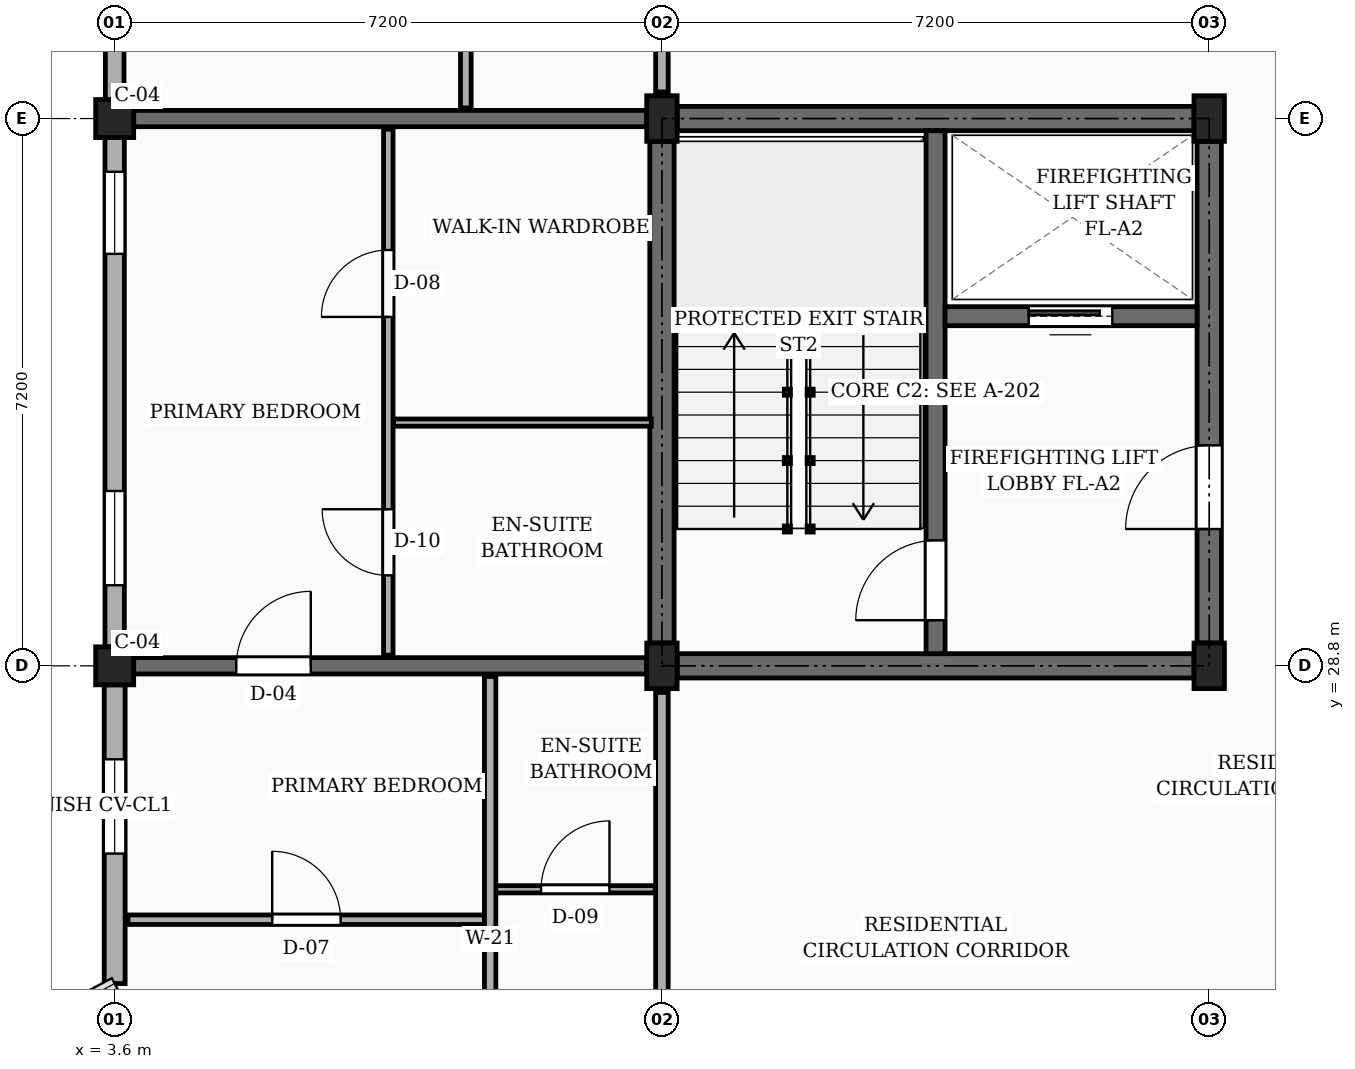
"""IFC4 building model, lengths in metres.
Left out: names, types, materials, properties, quantities, classifications, styles, units other than length and angle.
Written with IfcOpenShell. Run it as: python <this file> out.ifc"""

import sys

from ifc_helpers import new_model, si_unit, direction, frame, frame_2d, origin, origin_2d, place, context, subcontext, project, spatial, rectangle, extrude, element, fill, save


model = new_model("IFC4")
c1 = context("Model", 3, precision=1e-05, world=origin(), true_north=direction((0.0, 1.0)))
c2 = subcontext(c1, "Body", "Model", "MODEL_VIEW")
j1 = project(units=[si_unit("LENGTHUNIT", "METRE"), si_unit("PLANEANGLEUNIT", "RADIAN")], contexts=[c1])
p1 = place(None, origin())
s1 = spatial("IfcSite", under=j1, at=p1, CompositionType="ELEMENT")
p2 = place(p1, origin())
s2 = spatial("IfcBuilding", under=s1, at=p2, CompositionType="ELEMENT")
p3 = place(p2, frame((0.0, 0.0, 29.7)))
s3 = spatial("IfcBuildingStorey", under=s2, at=p3, CompositionType="ELEMENT", Elevation=29.7)
for number, where, z_axis, x_axis in (
    (1, (3.6, 28.8, 0.0), (0.0, 0.0, 1.0), (1.0, 0.0, 0.0)),
    (2, (3.6, 36.0, 0.0), (0.0, 0.0, 1.0), (1.0, 0.0, 0.0)),
):
    element("IfcColumn", number, at=place(p3, frame(where, z_axis=z_axis, x_axis=x_axis)), inside=s3, PredefinedType="COLUMN", context=c2, shape_type="SweptSolid", body=[
        extrude(rectangle(XDim=0.5, YDim=0.5, at=origin_2d()), origin(), (0.0, 0.0, 1.0), 3.15),
    ])
for number, where, z_axis, x_axis in (
    (3, (10.8, 28.8, 0.0), (0.0, 0.0, 1.0), (1.0, 0.0, 0.0)),
    (4, (10.8, 36.0, 0.0), (0.0, 0.0, 1.0), (1.0, 0.0, 0.0)),
    (5, (18.0, 28.8, 0.0), (0.0, 0.0, 1.0), (1.0, 0.0, 0.0)),
    (6, (18.0, 36.0, 0.0), (0.0, 0.0, 1.0), (1.0, 0.0, 0.0)),
):
    element("IfcColumn", number, at=place(p3, frame(where, z_axis=z_axis, x_axis=x_axis)), inside=s3, PredefinedType="COLUMN", context=c2, shape_type="SweptSolid", body=[
        extrude(rectangle(XDim=0.4, YDim=0.6, at=origin_2d()), origin(), (0.0, 0.0, 1.0), 3.15),
    ])
p4 = place(p3, frame((3.85, 28.8, 0.0), z_axis=(0.0, 0.0, 1.0), x_axis=(1.0, 0.0, 0.0)))
e7 = element("IfcWall", 7, at=p4, inside=s3, PredefinedType="SOLIDWALL", context=c2, shape_type="SweptSolid", body=[
    extrude(rectangle(XDim=6.75, YDim=0.215, at=frame_2d((3.375, 0.0))), origin(), (0.0, 0.0, 1.0), 2.17),
])
p5 = place(p4, frame((1.35, 0.0, 0.0)))
e8 = element("IfcOpeningElement", 8, at=p5, cuts=e7, PredefinedType="OPENING", context=c2, shape_type="SweptSolid", body=[
    extrude(rectangle(XDim=0.98, YDim=2.12, at=frame_2d((0.49, 1.06))), frame((0.0, 0.118, 0.0), z_axis=(0.0, -1.0, 0.0), x_axis=(1.0, 0.0, 0.0)), (0.0, 0.0, 1.0), 0.235),
])
p6 = place(p3, frame((3.85, 36.0, 0.0), z_axis=(0.0, 0.0, 1.0), x_axis=(1.0, 0.0, 0.0)))
e9 = element("IfcWall", 9, at=p6, inside=s3, PredefinedType="SOLIDWALL", context=c2, shape_type="SweptSolid", body=[
    extrude(rectangle(XDim=6.75, YDim=0.215, at=frame_2d((3.375, 0.0))), origin(), (0.0, 0.0, 1.0), 2.17),
])
p7 = place(p3, frame((3.6, 42.95, 0.0), z_axis=(0.0, 0.0, 1.0), x_axis=(0.0, -1.0, 0.0)))
e10 = element("IfcWall", 10, at=p7, inside=s3, PredefinedType="SOLIDWALL", context=c2, shape_type="SweptSolid", body=[
    extrude(rectangle(XDim=6.7, YDim=0.245, at=frame_2d((3.35, 0.0))), origin(), (0.0, 0.0, 1.0), 2.44),
])
p8 = place(p7, frame((0.45, 0.0, 0.78)))
e11 = element("IfcOpeningElement", 11, at=p8, cuts=e10, PredefinedType="OPENING", context=c2, shape_type="SweptSolid", body=[
    extrude(rectangle(XDim=0.92, YDim=1.15, at=frame_2d((0.46, 0.575))), frame((0.0, 0.133, 0.0), z_axis=(0.0, -1.0, 0.0), x_axis=(1.0, 0.0, 0.0)), (0.0, 0.0, 1.0), 0.265),
])
p9 = place(p7, frame((4.65, 0.0, 0.78)))
e12 = element("IfcOpeningElement", 12, at=p9, cuts=e10, PredefinedType="OPENING", context=c2, shape_type="SweptSolid", body=[
    extrude(rectangle(XDim=1.08, YDim=1.15, at=frame_2d((0.54, 0.575))), frame((0.0, 0.133, 0.0), z_axis=(0.0, -1.0, 0.0), x_axis=(1.0, 0.0, 0.0)), (0.0, 0.0, 1.0), 0.265),
])
p10 = place(p3, frame((3.6, 35.75, 0.0), z_axis=(0.0, 0.0, 1.0), x_axis=(0.0, -1.0, 0.0)))
e13 = element("IfcWall", 13, at=p10, inside=s3, PredefinedType="SOLIDWALL", context=c2, shape_type="SweptSolid", body=[
    extrude(rectangle(XDim=6.7, YDim=0.255, at=frame_2d((3.35, 0.0))), origin(), (0.0, 0.0, 1.0), 2.44),
])
p11 = place(p10, frame((0.45, 0.0, 0.78)))
e14 = element("IfcOpeningElement", 14, at=p11, cuts=e13, PredefinedType="OPENING", context=c2, shape_type="SweptSolid", body=[
    extrude(rectangle(XDim=1.08, YDim=1.15, at=frame_2d((0.54, 0.575))), frame((0.0, 0.137, 0.0), z_axis=(0.0, -1.0, 0.0), x_axis=(1.0, 0.0, 0.0)), (0.0, 0.0, 1.0), 0.275),
])
p12 = place(p10, frame((4.65, 0.0, 0.78)))
e15 = element("IfcOpeningElement", 15, at=p12, cuts=e13, PredefinedType="OPENING", context=c2, shape_type="SweptSolid", body=[
    extrude(rectangle(XDim=1.24, YDim=1.15, at=frame_2d((0.62, 0.575))), frame((0.0, 0.137, 0.0), z_axis=(0.0, -1.0, 0.0), x_axis=(1.0, 0.0, 0.0)), (0.0, 0.0, 1.0), 0.275),
])
p13 = place(p3, frame((3.6, 28.55, 0.0), z_axis=(0.0, 0.0, 1.0), x_axis=(0.0, -1.0, 0.0)))
e16 = element("IfcWall", 16, at=p13, inside=s3, PredefinedType="SOLIDWALL", context=c2, shape_type="SweptSolid", body=[
    extrude(rectangle(XDim=3.93, YDim=0.275, at=frame_2d((1.965, 0.0))), origin(), (0.0, 0.0, 1.0), 2.44),
])
p14 = place(p13, frame((0.98, 0.0, 0.78)))
e17 = element("IfcOpeningElement", 17, at=p14, cuts=e16, PredefinedType="OPENING", context=c2, shape_type="SweptSolid", body=[
    extrude(rectangle(XDim=1.24, YDim=1.15, at=frame_2d((0.62, 0.575))), frame((0.0, 0.147, 0.0), z_axis=(0.0, -1.0, 0.0), x_axis=(1.0, 0.0, 0.0)), (0.0, 0.0, 1.0), 0.295),
])
p15 = place(p3, frame((10.8, 29.1, 0.0), z_axis=(0.0, 0.0, 1.0), x_axis=(0.0, 1.0, 0.0)))
e18 = element("IfcWall", 18, at=p15, inside=s3, PredefinedType="SHEAR", context=c2, shape_type="SweptSolid", body=[
    extrude(rectangle(XDim=6.6, YDim=0.32, at=frame_2d((3.3, 0.0))), origin(), (0.0, 0.0, 1.0), 2.87),
])
p16 = place(p3, frame((11.0, 36.0, 0.0), z_axis=(0.0, 0.0, 1.0), x_axis=(1.0, 0.0, 0.0)))
e19 = element("IfcWall", 19, at=p16, inside=s3, PredefinedType="SHEAR", context=c2, shape_type="SweptSolid", body=[
    extrude(rectangle(XDim=6.8, YDim=0.32, at=frame_2d((3.4, 0.0))), origin(), (0.0, 0.0, 1.0), 2.87),
])
p17 = place(p3, frame((18.0, 29.1, 0.0), z_axis=(0.0, 0.0, 1.0), x_axis=(0.0, 1.0, 0.0)))
e20 = element("IfcWall", 20, at=p17, inside=s3, PredefinedType="SHEAR", context=c2, shape_type="SweptSolid", body=[
    extrude(rectangle(XDim=6.6, YDim=0.32, at=frame_2d((3.3, 0.0))), origin(), (0.0, 0.0, 1.0), 2.87),
])
p18 = place(p17, frame((1.5, 0.0, 0.0)))
e21 = element("IfcOpeningElement", 21, at=p18, cuts=e20, PredefinedType="OPENING", context=c2, shape_type="SweptSolid", body=[
    extrude(rectangle(XDim=1.1, YDim=2.15, at=frame_2d((0.55, 1.075))), frame((0.0, 0.17, 0.0), z_axis=(0.0, -1.0, 0.0), x_axis=(1.0, 0.0, 0.0)), (0.0, 0.0, 1.0), 0.34),
])
p19 = place(p3, frame((11.0, 28.8, 0.0), z_axis=(0.0, 0.0, 1.0), x_axis=(1.0, 0.0, 0.0)))
e22 = element("IfcWall", 22, at=p19, inside=s3, PredefinedType="SHEAR", context=c2, shape_type="SweptSolid", body=[
    extrude(rectangle(XDim=6.8, YDim=0.32, at=frame_2d((3.4, 0.0))), origin(), (0.0, 0.0, 1.0), 2.87),
])
p20 = place(p3, frame((14.4, 28.96, 0.0), z_axis=(0.0, 0.0, 1.0), x_axis=(0.0, 1.0, 0.0)))
e23 = element("IfcWall", 23, at=p20, inside=s3, PredefinedType="SHEAR", context=c2, shape_type="SweptSolid", body=[
    extrude(rectangle(XDim=6.88, YDim=0.25, at=frame_2d((3.44, 0.0))), origin(), (0.0, 0.0, 1.0), 2.87),
])
p21 = place(p20, frame((0.44, 0.0, 0.0)))
e24 = element("IfcOpeningElement", 24, at=p21, cuts=e23, PredefinedType="OPENING", context=c2, shape_type="SweptSolid", body=[
    extrude(rectangle(XDim=1.05, YDim=2.15, at=frame_2d((0.525, 1.075))), frame((0.0, 0.135, 0.0), z_axis=(0.0, -1.0, 0.0), x_axis=(1.0, 0.0, 0.0)), (0.0, 0.0, 1.0), 0.27),
])
p22 = place(p3, frame((14.525, 33.4, 0.0), z_axis=(0.0, 0.0, 1.0), x_axis=(1.0, 0.0, 0.0)))
e25 = element("IfcWall", 25, at=p22, inside=s3, PredefinedType="SHEAR", context=c2, shape_type="SweptSolid", body=[
    extrude(rectangle(XDim=3.315, YDim=0.25, at=frame_2d((1.658, 0.0))), origin(), (0.0, 0.0, 1.0), 2.87),
])
p23 = place(p22, frame((1.1, 0.0, 0.0)))
e26 = element("IfcOpeningElement", 26, at=p23, cuts=e25, PredefinedType="OPENING", context=c2, shape_type="SweptSolid", body=[
    extrude(rectangle(XDim=1.1, YDim=2.2, at=frame_2d((0.55, 1.1))), frame((0.0, 0.135, 0.0), z_axis=(0.0, -1.0, 0.0), x_axis=(1.0, 0.0, 0.0)), (0.0, 0.0, 1.0), 0.27),
])
p24 = place(p3, frame((10.8, 21.95, 0.0), z_axis=(0.0, 0.0, 1.0), x_axis=(0.0, 1.0, 0.0)))
e27 = element("IfcWall", 27, at=p24, inside=s3, PredefinedType="PARTITIONING", context=c2, shape_type="SweptSolid", body=[
    extrude(rectangle(XDim=6.5, YDim=0.165, at=frame_2d((3.25, 0.0))), origin(), (0.0, 0.0, 1.0), 2.305),
])
p25 = place(p24, frame((1.0, 0.0, 0.0)))
e28 = element("IfcOpeningElement", 28, at=p25, cuts=e27, PredefinedType="OPENING", context=c2, shape_type="SweptSolid", body=[
    extrude(rectangle(XDim=1.0, YDim=2.15, at=frame_2d((0.5, 1.075))), frame((0.0, 0.093, 0.0), z_axis=(0.0, -1.0, 0.0), x_axis=(1.0, 0.0, 0.0)), (0.0, 0.0, 1.0), 0.185),
])
p26 = place(p3, frame((10.8, 36.35, 0.0), z_axis=(0.0, 0.0, 1.0), x_axis=(0.0, 1.0, 0.0)))
e29 = element("IfcWall", 29, at=p26, inside=s3, PredefinedType="PARTITIONING", context=c2, shape_type="SweptSolid", body=[
    extrude(rectangle(XDim=6.5, YDim=0.165, at=frame_2d((3.25, 0.0))), origin(), (0.0, 0.0, 1.0), 2.305),
])
p27 = place(p26, frame((1.0, 0.0, 0.0)))
e30 = element("IfcOpeningElement", 30, at=p27, cuts=e29, PredefinedType="OPENING", context=c2, shape_type="SweptSolid", body=[
    extrude(rectangle(XDim=0.94, YDim=2.12, at=frame_2d((0.47, 1.06))), frame((0.0, 0.093, 0.0), z_axis=(0.0, -1.0, 0.0), x_axis=(1.0, 0.0, 0.0)), (0.0, 0.0, 1.0), 0.185),
])
p28 = place(p3, frame((3.775, 25.46, 0.0), z_axis=(0.0, 0.0, 1.0), x_axis=(1.0, 0.0, 0.0)))
e31 = element("IfcWall", 31, at=p28, inside=s3, PredefinedType="PARTITIONING", context=c2, shape_type="SweptSolid", body=[
    extrude(rectangle(XDim=4.695, YDim=0.125, at=frame_2d((2.348, 0.0))), origin(), (0.0, 0.0, 1.0), 2.305),
])
p29 = place(p28, frame((1.897, 0.0, 0.0)))
e32 = element("IfcOpeningElement", 32, at=p29, cuts=e31, PredefinedType="OPENING", context=c2, shape_type="SweptSolid", body=[
    extrude(rectangle(XDim=0.9, YDim=2.1, at=frame_2d((0.45, 1.05))), frame((0.0, 0.073, 0.0), z_axis=(0.0, -1.0, 0.0), x_axis=(1.0, 0.0, 0.0)), (0.0, 0.0, 1.0), 0.145),
])
p30 = place(p3, frame((8.61, 25.86, 0.0), z_axis=(0.0, 0.0, 1.0), x_axis=(1.0, 0.0, 0.0)))
e33 = element("IfcWall", 33, at=p30, inside=s3, PredefinedType="PARTITIONING", context=c2, shape_type="SweptSolid", body=[
    extrude(rectangle(XDim=2.1, YDim=0.095, at=frame_2d((1.05, 0.0))), origin(), (0.0, 0.0, 1.0), 2.305),
])
p31 = place(p30, frame((0.6, 0.0, 0.0)))
e34 = element("IfcOpeningElement", 34, at=p31, cuts=e33, PredefinedType="OPENING", context=c2, shape_type="SweptSolid", body=[
    extrude(rectangle(XDim=0.9, YDim=2.05, at=frame_2d((0.45, 1.025))), frame((0.0, 0.058, 0.0), z_axis=(0.0, -1.0, 0.0), x_axis=(1.0, 0.0, 0.0)), (0.0, 0.0, 1.0), 0.115),
])
p32 = place(p3, frame((8.54, 21.74, 0.0), z_axis=(0.0, 0.0, 1.0), x_axis=(0.0, 1.0, 0.0)))
e35 = element("IfcWall", 35, at=p32, inside=s3, PredefinedType="PARTITIONING", context=c2, shape_type="SweptSolid", body=[
    extrude(rectangle(XDim=6.92, YDim=0.15, at=frame_2d((3.46, 0.0))), origin(), (0.0, 0.0, 1.0), 2.305),
])
p33 = place(p32, frame((1.31, 0.0, 0.0)))
e36 = element("IfcOpeningElement", 36, at=p33, cuts=e35, PredefinedType="OPENING", context=c2, shape_type="SweptSolid", body=[
    extrude(rectangle(XDim=0.95, YDim=2.1, at=frame_2d((0.475, 1.05))), frame((0.0, 0.085, 0.0), z_axis=(0.0, -1.0, 0.0), x_axis=(1.0, 0.0, 0.0)), (0.0, 0.0, 1.0), 0.17),
])
p34 = place(p3, frame((7.2, 28.94, 0.0), z_axis=(0.0, 0.0, 1.0), x_axis=(0.0, 1.0, 0.0)))
e37 = element("IfcWall", 37, at=p34, inside=s3, PredefinedType="PARTITIONING", context=c2, shape_type="SweptSolid", body=[
    extrude(rectangle(XDim=6.92, YDim=0.125, at=frame_2d((3.46, 0.0))), origin(), (0.0, 0.0, 1.0), 2.305),
])
p35 = place(p34, frame((1.05, 0.0, 0.0)))
e38 = element("IfcOpeningElement", 38, at=p35, cuts=e37, PredefinedType="OPENING", context=c2, shape_type="SweptSolid", body=[
    extrude(rectangle(XDim=0.87, YDim=2.05, at=frame_2d((0.435, 1.025))), frame((0.0, 0.073, 0.0), z_axis=(0.0, -1.0, 0.0), x_axis=(1.0, 0.0, 0.0)), (0.0, 0.0, 1.0), 0.145),
])
p36 = place(p34, frame((4.45, 0.0, 0.0)))
e39 = element("IfcOpeningElement", 39, at=p36, cuts=e37, PredefinedType="OPENING", context=c2, shape_type="SweptSolid", body=[
    extrude(rectangle(XDim=0.88, YDim=2.08, at=frame_2d((0.44, 1.04))), frame((0.0, 0.073, 0.0), z_axis=(0.0, -1.0, 0.0), x_axis=(1.0, 0.0, 0.0)), (0.0, 0.0, 1.0), 0.145),
])
p37 = place(p3, frame((7.27, 32.0, 0.0), z_axis=(0.0, 0.0, 1.0), x_axis=(1.0, 0.0, 0.0)))
e40 = element("IfcWall", 40, at=p37, inside=s3, PredefinedType="PARTITIONING", context=c2, shape_type="SweptSolid", body=[
    extrude(rectangle(XDim=3.39, YDim=0.095, at=frame_2d((1.695, 0.0))), origin(), (0.0, 0.0, 1.0), 2.305),
])
p38 = place(p3, frame((8.22, 36.14, 0.0), z_axis=(0.0, 0.0, 1.0), x_axis=(0.0, 1.0, 0.0)))
e41 = element("IfcWall", 41, at=p38, inside=s3, PredefinedType="PARTITIONING", context=c2, shape_type="SweptSolid", body=[
    extrude(rectangle(XDim=6.885, YDim=0.14, at=frame_2d((3.442, 0.0))), origin(), (0.0, 0.0, 1.0), 2.305),
])
p39 = place(p38, frame((1.31, 0.0, 0.0)))
e42 = element("IfcOpeningElement", 42, at=p39, cuts=e41, PredefinedType="OPENING", context=c2, shape_type="SweptSolid", body=[
    extrude(rectangle(XDim=0.95, YDim=2.1, at=frame_2d((0.475, 1.05))), frame((0.0, 0.08, 0.0), z_axis=(0.0, -1.0, 0.0), x_axis=(1.0, 0.0, 0.0)), (0.0, 0.0, 1.0), 0.16),
])
p40 = place(p11, origin())
e43 = element("IfcWindow", 43, at=p40, inside=s3, PartitioningType="SINGLE_PANEL", PredefinedType="WINDOW", context=c2, shape_type="SweptSolid", body=[
    extrude(rectangle(XDim=1.08, YDim=1.15, at=frame_2d((0.54, 0.575))), frame((0.0, 0.03, 0.0), z_axis=(0.0, -1.0, 0.0), x_axis=(1.0, 0.0, 0.0)), (0.0, 0.0, 1.0), 0.06),
])
fill(e14, e43)
p41 = place(p12, origin())
e44 = element("IfcWindow", 44, at=p41, inside=s3, PartitioningType="SINGLE_PANEL", PredefinedType="WINDOW", context=c2, shape_type="SweptSolid", body=[
    extrude(rectangle(XDim=1.24, YDim=1.15, at=frame_2d((0.62, 0.575))), frame((0.0, 0.03, 0.0), z_axis=(0.0, -1.0, 0.0), x_axis=(1.0, 0.0, 0.0)), (0.0, 0.0, 1.0), 0.06),
])
fill(e15, e44)
p42 = place(p14, origin())
e45 = element("IfcWindow", 45, at=p42, inside=s3, PartitioningType="SINGLE_PANEL", PredefinedType="WINDOW", context=c2, shape_type="SweptSolid", body=[
    extrude(rectangle(XDim=1.24, YDim=1.15, at=frame_2d((0.62, 0.575))), frame((0.0, 0.03, 0.0), z_axis=(0.0, -1.0, 0.0), x_axis=(1.0, 0.0, 0.0)), (0.0, 0.0, 1.0), 0.06),
])
fill(e17, e45)
p43 = place(p18, frame((1.1, 0.0, 0.0), z_axis=(0.0, 0.0, 1.0), x_axis=(-1.0, 0.0, 0.0)))
e46 = element("IfcDoor", 46, at=p43, inside=s3, OperationType="SINGLE_SWING_LEFT", PredefinedType="DOOR", context=c2, shape_type="SweptSolid", body=[
    extrude(rectangle(XDim=1.1, YDim=2.15, at=frame_2d((0.55, 1.075))), frame((0.0, 0.025, 0.0), z_axis=(0.0, -1.0, 0.0), x_axis=(1.0, 0.0, 0.0)), (0.0, 0.0, 1.0), 0.05),
])
fill(e21, e46)
p44 = place(p21, origin())
e47 = element("IfcDoor", 47, at=p44, inside=s3, OperationType="SINGLE_SWING_LEFT", PredefinedType="DOOR", context=c2, shape_type="SweptSolid", body=[
    extrude(rectangle(XDim=1.05, YDim=2.15, at=frame_2d((0.525, 1.075))), frame((0.0, 0.025, 0.0), z_axis=(0.0, -1.0, 0.0), x_axis=(1.0, 0.0, 0.0)), (0.0, 0.0, 1.0), 0.05),
])
fill(e24, e47)
p45 = place(p23, origin())
e48 = element("IfcDoor", 48, at=p45, inside=s3, OperationType="SLIDING_TO_LEFT", PredefinedType="DOOR", context=c2, shape_type="SweptSolid", body=[
    extrude(rectangle(XDim=1.1, YDim=2.2, at=frame_2d((0.55, 1.1))), frame((0.0, 0.025, 0.0), z_axis=(0.0, -1.0, 0.0), x_axis=(1.0, 0.0, 0.0)), (0.0, 0.0, 1.0), 0.05),
])
fill(e26, e48)
p46 = place(p29, origin())
e49 = element("IfcDoor", 49, at=p46, inside=s3, OperationType="SINGLE_SWING_LEFT", PredefinedType="DOOR", context=c2, shape_type="SweptSolid", body=[
    extrude(rectangle(XDim=0.9, YDim=2.1, at=frame_2d((0.45, 1.05))), frame((0.0, 0.025, 0.0), z_axis=(0.0, -1.0, 0.0), x_axis=(1.0, 0.0, 0.0)), (0.0, 0.0, 1.0), 0.05),
])
fill(e32, e49)
p47 = place(p31, origin())
e50 = element("IfcDoor", 50, at=p47, inside=s3, OperationType="SINGLE_SWING_RIGHT", PredefinedType="DOOR", context=c2, shape_type="SweptSolid", body=[
    extrude(rectangle(XDim=0.9, YDim=2.05, at=frame_2d((0.45, 1.025))), frame((0.0, 0.025, 0.0), z_axis=(0.0, -1.0, 0.0), x_axis=(1.0, 0.0, 0.0)), (0.0, 0.0, 1.0), 0.05),
])
fill(e34, e50)
p48 = place(p35, origin())
e51 = element("IfcDoor", 51, at=p48, inside=s3, OperationType="SINGLE_SWING_RIGHT", PredefinedType="DOOR", context=c2, shape_type="SweptSolid", body=[
    extrude(rectangle(XDim=0.87, YDim=2.05, at=frame_2d((0.435, 1.025))), frame((0.0, 0.025, 0.0), z_axis=(0.0, -1.0, 0.0), x_axis=(1.0, 0.0, 0.0)), (0.0, 0.0, 1.0), 0.05),
])
fill(e38, e51)
p49 = place(p36, origin())
e52 = element("IfcDoor", 52, at=p49, inside=s3, OperationType="SINGLE_SWING_LEFT", PredefinedType="DOOR", context=c2, shape_type="SweptSolid", body=[
    extrude(rectangle(XDim=0.88, YDim=2.08, at=frame_2d((0.44, 1.04))), frame((0.0, 0.025, 0.0), z_axis=(0.0, -1.0, 0.0), x_axis=(1.0, 0.0, 0.0)), (0.0, 0.0, 1.0), 0.05),
])
fill(e39, e52)
p50 = place(p5, origin())
e53 = element("IfcDoor", 53, at=p50, inside=s3, OperationType="SINGLE_SWING_RIGHT", PredefinedType="DOOR", context=c2, shape_type="SweptSolid", body=[
    extrude(rectangle(XDim=0.98, YDim=2.12, at=frame_2d((0.49, 1.06))), frame((0.0, 0.025, 0.0), z_axis=(0.0, -1.0, 0.0), x_axis=(1.0, 0.0, 0.0)), (0.0, 0.0, 1.0), 0.05),
])
fill(e8, e53)
save(model, sys.argv[1])
